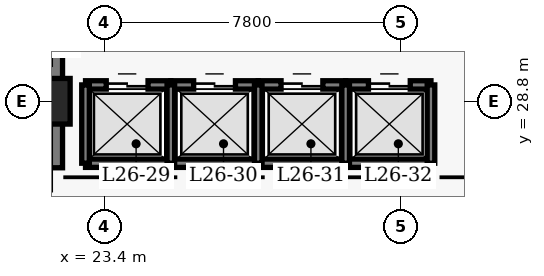
"""IFC4 building model, lengths in metres.
Left out: names, types, materials, properties, quantities, classifications, styles, units other than length and angle.
Written with IfcOpenShell. Run it as: python <this file> out.ifc"""

import sys

from ifc_helpers import new_model, si_unit, direction, frame, frame_2d, origin, origin_2d, place, context, subcontext, project, spatial, rectangle, extrude, element, fill, save


model = new_model("IFC4")
c1 = context("Model", 3, precision=1e-05, world=origin(), true_north=direction((0.0, 1.0)))
c2 = subcontext(c1, "Body", "Model", "MODEL_VIEW")
j1 = project(units=[si_unit("LENGTHUNIT", "METRE"), si_unit("PLANEANGLEUNIT", "RADIAN")], contexts=[c1])
p1 = place(None, origin())
s1 = spatial("IfcSite", under=j1, at=p1, CompositionType="ELEMENT")
p2 = place(p1, origin())
s2 = spatial("IfcBuilding", under=s1, at=p2, CompositionType="ELEMENT")
p3 = place(p2, frame((0.0, 0.0, 107.0)))
s3 = spatial("IfcBuildingStorey", under=s2, at=p3, CompositionType="ELEMENT", Elevation=107.0)
p4 = place(p3, frame((21.9, 27.05, 0.0), z_axis=(0.0, 0.0, 1.0), x_axis=(0.0, 1.0, 0.0)))
e1 = element("IfcWall", 1, at=p4, inside=s3, PredefinedType="SHEAR", context=c2, shape_type="SweptSolid", body=[
    extrude(rectangle(XDim=13.67, YDim=0.8, at=frame_2d((6.835, 0.0))), origin(), (0.0, 0.0, 1.0), 3.8),
])
p5 = place(p3, frame((21.9, 28.8, 0.0), z_axis=(0.0, 0.0, 1.0), x_axis=(1.0, 0.0, 0.0)))
e2 = element("IfcColumn", 2, at=p5, inside=s3, PredefinedType="COLUMN", context=c2, shape_type="SweptSolid", body=[
    extrude(rectangle(XDim=1.2, YDim=1.2, at=origin_2d()), origin(), (0.0, 0.0, 1.0), 3.8),
])
p6 = place(p3, frame((22.905, 29.23, 0.0), z_axis=(0.0, 0.0, 1.0), x_axis=(1.0, 0.0, 0.0)))
e3 = element("IfcWall", 3, at=p6, inside=s3, PredefinedType="SHEAR", context=c2, shape_type="SweptSolid", body=[
    extrude(rectangle(XDim=2.245, YDim=0.22, at=frame_2d((1.123, 0.0))), origin(), (0.0, 0.0, 1.0), 3.8),
])
p7 = place(p6, frame((0.545, 0.0, 0.0)))
e4 = element("IfcOpeningElement", 4, at=p7, cuts=e3, PredefinedType="OPENING", context=c2, shape_type="SweptSolid", body=[
    extrude(rectangle(XDim=1.1, YDim=2.15, at=frame_2d((0.55, 1.075))), frame((0.0, 0.12, 0.0), z_axis=(0.0, -1.0, 0.0), x_axis=(1.0, 0.0, 0.0)), (0.0, 0.0, 1.0), 0.24),
])
p8 = place(p3, frame((22.905, 27.17, 0.0), z_axis=(0.0, 0.0, 1.0), x_axis=(1.0, 0.0, 0.0)))
e5 = element("IfcWall", 5, at=p8, inside=s3, PredefinedType="SHEAR", context=c2, shape_type="SweptSolid", body=[
    extrude(rectangle(XDim=2.245, YDim=0.22, at=frame_2d((1.123, 0.0))), origin(), (0.0, 0.0, 1.0), 3.8),
])
p9 = place(p3, frame((22.905, 27.17, 0.0), z_axis=(0.0, 0.0, 1.0), x_axis=(0.0, 1.0, 0.0)))
e6 = element("IfcWall", 6, at=p9, inside=s3, PredefinedType="SHEAR", context=c2, shape_type="SweptSolid", body=[
    extrude(rectangle(XDim=2.06, YDim=0.2, at=frame_2d((1.03, 0.0))), origin(), (0.0, 0.0, 1.0), 3.8),
])
p10 = place(p3, frame((25.15, 29.23, 0.0), z_axis=(0.0, 0.0, 1.0), x_axis=(1.0, 0.0, 0.0)))
e7 = element("IfcWall", 7, at=p10, inside=s3, PredefinedType="SHEAR", context=c2, shape_type="SweptSolid", body=[
    extrude(rectangle(XDim=2.3, YDim=0.22, at=frame_2d((1.15, 0.0))), origin(), (0.0, 0.0, 1.0), 3.8),
])
p11 = place(p10, frame((0.6, 0.0, 0.0)))
e8 = element("IfcOpeningElement", 8, at=p11, cuts=e7, PredefinedType="OPENING", context=c2, shape_type="SweptSolid", body=[
    extrude(rectangle(XDim=1.1, YDim=2.15, at=frame_2d((0.55, 1.075))), frame((0.0, 0.12, 0.0), z_axis=(0.0, -1.0, 0.0), x_axis=(1.0, 0.0, 0.0)), (0.0, 0.0, 1.0), 0.24),
])
p12 = place(p3, frame((25.15, 27.17, 0.0), z_axis=(0.0, 0.0, 1.0), x_axis=(1.0, 0.0, 0.0)))
e9 = element("IfcWall", 9, at=p12, inside=s3, PredefinedType="SHEAR", context=c2, shape_type="SweptSolid", body=[
    extrude(rectangle(XDim=2.3, YDim=0.22, at=frame_2d((1.15, 0.0))), origin(), (0.0, 0.0, 1.0), 3.8),
])
p13 = place(p3, frame((25.15, 27.17, 0.0), z_axis=(0.0, 0.0, 1.0), x_axis=(0.0, 1.0, 0.0)))
e10 = element("IfcWall", 10, at=p13, inside=s3, PredefinedType="SHEAR", context=c2, shape_type="SweptSolid", body=[
    extrude(rectangle(XDim=2.06, YDim=0.2, at=frame_2d((1.03, 0.0))), origin(), (0.0, 0.0, 1.0), 3.8),
])
p14 = place(p3, frame((27.45, 29.23, 0.0), z_axis=(0.0, 0.0, 1.0), x_axis=(1.0, 0.0, 0.0)))
e11 = element("IfcWall", 11, at=p14, inside=s3, PredefinedType="SHEAR", context=c2, shape_type="SweptSolid", body=[
    extrude(rectangle(XDim=2.3, YDim=0.22, at=frame_2d((1.15, 0.0))), origin(), (0.0, 0.0, 1.0), 3.8),
])
p15 = place(p14, frame((0.6, 0.0, 0.0)))
e12 = element("IfcOpeningElement", 12, at=p15, cuts=e11, PredefinedType="OPENING", context=c2, shape_type="SweptSolid", body=[
    extrude(rectangle(XDim=1.1, YDim=2.15, at=frame_2d((0.55, 1.075))), frame((0.0, 0.12, 0.0), z_axis=(0.0, -1.0, 0.0), x_axis=(1.0, 0.0, 0.0)), (0.0, 0.0, 1.0), 0.24),
])
p16 = place(p3, frame((27.45, 27.17, 0.0), z_axis=(0.0, 0.0, 1.0), x_axis=(1.0, 0.0, 0.0)))
e13 = element("IfcWall", 13, at=p16, inside=s3, PredefinedType="SHEAR", context=c2, shape_type="SweptSolid", body=[
    extrude(rectangle(XDim=2.3, YDim=0.22, at=frame_2d((1.15, 0.0))), origin(), (0.0, 0.0, 1.0), 3.8),
])
p17 = place(p3, frame((27.45, 27.17, 0.0), z_axis=(0.0, 0.0, 1.0), x_axis=(0.0, 1.0, 0.0)))
e14 = element("IfcWall", 14, at=p17, inside=s3, PredefinedType="SHEAR", context=c2, shape_type="SweptSolid", body=[
    extrude(rectangle(XDim=2.06, YDim=0.2, at=frame_2d((1.03, 0.0))), origin(), (0.0, 0.0, 1.0), 3.8),
])
p18 = place(p3, frame((29.75, 29.23, 0.0), z_axis=(0.0, 0.0, 1.0), x_axis=(1.0, 0.0, 0.0)))
e15 = element("IfcWall", 15, at=p18, inside=s3, PredefinedType="SHEAR", context=c2, shape_type="SweptSolid", body=[
    extrude(rectangle(XDim=2.245, YDim=0.22, at=frame_2d((1.123, 0.0))), origin(), (0.0, 0.0, 1.0), 3.8),
])
p19 = place(p18, frame((0.6, 0.0, 0.0)))
e16 = element("IfcOpeningElement", 16, at=p19, cuts=e15, PredefinedType="OPENING", context=c2, shape_type="SweptSolid", body=[
    extrude(rectangle(XDim=1.1, YDim=2.15, at=frame_2d((0.55, 1.075))), frame((0.0, 0.12, 0.0), z_axis=(0.0, -1.0, 0.0), x_axis=(1.0, 0.0, 0.0)), (0.0, 0.0, 1.0), 0.24),
])
p20 = place(p3, frame((29.75, 27.17, 0.0), z_axis=(0.0, 0.0, 1.0), x_axis=(1.0, 0.0, 0.0)))
e17 = element("IfcWall", 17, at=p20, inside=s3, PredefinedType="SHEAR", context=c2, shape_type="SweptSolid", body=[
    extrude(rectangle(XDim=2.245, YDim=0.22, at=frame_2d((1.123, 0.0))), origin(), (0.0, 0.0, 1.0), 3.8),
])
for number, where, z_axis, x_axis in (
    (18, (29.75, 27.17, 0.0), (0.0, 0.0, 1.0), (0.0, 1.0, 0.0)),
    (19, (31.995, 27.17, 0.0), (0.0, 0.0, 1.0), (0.0, 1.0, 0.0)),
):
    element("IfcWall", number, at=place(p3, frame(where, z_axis=z_axis, x_axis=x_axis)), inside=s3, PredefinedType="SHEAR", context=c2, shape_type="SweptSolid", body=[
        extrude(rectangle(XDim=2.06, YDim=0.2, at=frame_2d((1.03, 0.0))), origin(), (0.0, 0.0, 1.0), 3.8),
    ])
p21 = place(p7, origin())
e20 = element("IfcDoor", 20, at=p21, inside=s3, OperationType="DOUBLE_DOOR_SLIDING", PredefinedType="DOOR", context=c2, shape_type="SweptSolid", body=[
    extrude(rectangle(XDim=1.1, YDim=2.15, at=frame_2d((0.55, 1.075))), frame((0.0, 0.025, 0.0), z_axis=(0.0, -1.0, 0.0), x_axis=(1.0, 0.0, 0.0)), (0.0, 0.0, 1.0), 0.05),
])
fill(e4, e20)
p22 = place(p11, origin())
e21 = element("IfcDoor", 21, at=p22, inside=s3, OperationType="DOUBLE_DOOR_SLIDING", PredefinedType="DOOR", context=c2, shape_type="SweptSolid", body=[
    extrude(rectangle(XDim=1.1, YDim=2.15, at=frame_2d((0.55, 1.075))), frame((0.0, 0.025, 0.0), z_axis=(0.0, -1.0, 0.0), x_axis=(1.0, 0.0, 0.0)), (0.0, 0.0, 1.0), 0.05),
])
fill(e8, e21)
p23 = place(p15, origin())
e22 = element("IfcDoor", 22, at=p23, inside=s3, OperationType="DOUBLE_DOOR_SLIDING", PredefinedType="DOOR", context=c2, shape_type="SweptSolid", body=[
    extrude(rectangle(XDim=1.1, YDim=2.15, at=frame_2d((0.55, 1.075))), frame((0.0, 0.025, 0.0), z_axis=(0.0, -1.0, 0.0), x_axis=(1.0, 0.0, 0.0)), (0.0, 0.0, 1.0), 0.05),
])
fill(e12, e22)
p24 = place(p19, origin())
e23 = element("IfcDoor", 23, at=p24, inside=s3, OperationType="DOUBLE_DOOR_SLIDING", PredefinedType="DOOR", context=c2, shape_type="SweptSolid", body=[
    extrude(rectangle(XDim=1.1, YDim=2.15, at=frame_2d((0.55, 1.075))), frame((0.0, 0.025, 0.0), z_axis=(0.0, -1.0, 0.0), x_axis=(1.0, 0.0, 0.0)), (0.0, 0.0, 1.0), 0.05),
])
fill(e16, e23)
save(model, sys.argv[1])
